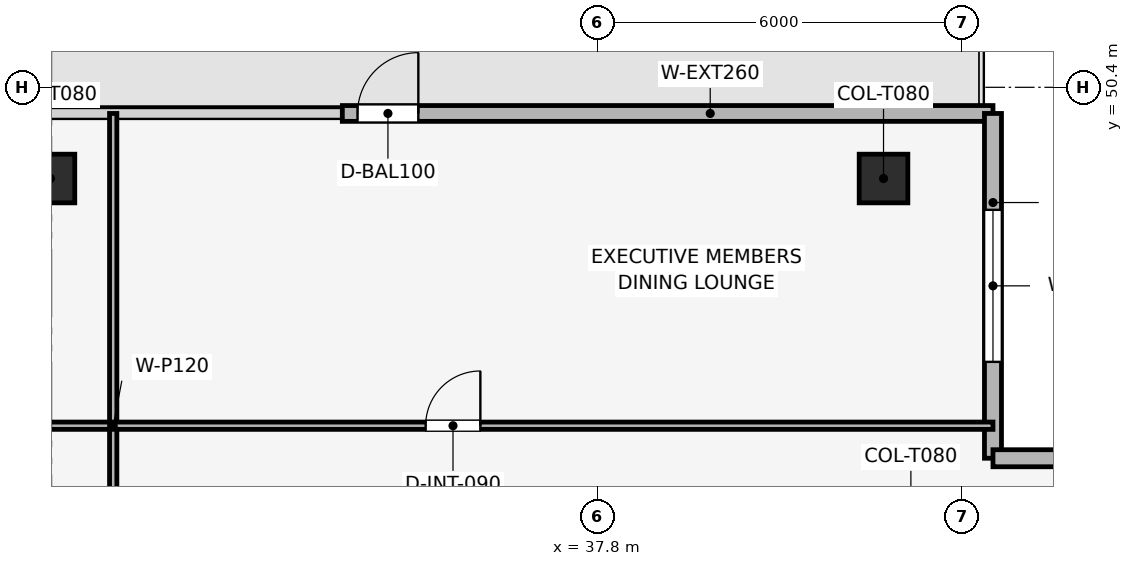
"""IFC4 building model, lengths in metres.
Left out: names, types, materials, properties, quantities, classifications, styles, units other than length and angle.
Written with IfcOpenShell. Run it as: python <this file> out.ifc"""

import sys

from ifc_helpers import new_model, si_unit, direction, frame, frame_2d, origin, origin_2d, place, context, subcontext, project, spatial, rectangle, extrude, element, fill, save


model = new_model("IFC4")
c1 = context("Model", 3, precision=1e-05, world=origin(), true_north=direction((0.0, 1.0)))
c2 = subcontext(c1, "Body", "Model", "MODEL_VIEW")
j1 = project(units=[si_unit("LENGTHUNIT", "METRE"), si_unit("PLANEANGLEUNIT", "RADIAN")], contexts=[c1])
p1 = place(None, origin())
s1 = spatial("IfcSite", under=j1, at=p1, CompositionType="ELEMENT")
p2 = place(p1, origin())
s2 = spatial("IfcBuilding", under=s1, at=p2, CompositionType="ELEMENT")
p3 = place(p2, frame((0.0, 0.0, 348.0)))
s3 = spatial("IfcBuildingStorey", under=s2, at=p3, CompositionType="ELEMENT", Elevation=348.0)
for number, where, z_axis, x_axis in (
    (1, (42.5, 48.9, 0.003), (0.0, 0.0, 1.0), (1.0, 0.0, 0.0)),
    (2, (28.8, 48.9, 0.003), (0.0, 0.0, 1.0), (1.0, 0.0, 0.0)),
):
    element("IfcColumn", number, at=place(p3, frame(where, z_axis=z_axis, x_axis=x_axis)), inside=s3, PredefinedType="COLUMN", context=c2, shape_type="SweptSolid", body=[
        extrude(rectangle(XDim=0.8, YDim=0.8, at=origin_2d()), origin(), (0.0, 0.0, 1.0), 3.504),
    ])
p4 = place(p3, frame((33.6, 49.97, 0.0), z_axis=(0.0, 0.0, 1.0), x_axis=(1.0, 0.0, 0.0)))
e3 = element("IfcWall", 3, at=p4, inside=s3, PredefinedType="SOLIDWALL", context=c2, shape_type="SweptSolid", body=[
    extrude(rectangle(XDim=10.7, YDim=0.26, at=frame_2d((5.35, 0.0))), origin(), (0.0, 0.0, 1.0), 3.51),
])
p5 = place(p4, frame((0.25, 0.0, 0.0)))
e4 = element("IfcOpeningElement", 4, at=p5, cuts=e3, PredefinedType="OPENING", context=c2, shape_type="SweptSolid", body=[
    extrude(rectangle(XDim=1.0, YDim=2.2, at=frame_2d((0.5, 1.1))), frame((0.0, 0.14, 0.0), z_axis=(0.0, -1.0, 0.0), x_axis=(1.0, 0.0, 0.0)), (0.0, 0.0, 1.0), 0.28),
])
p6 = place(p3, frame((44.3, 49.97, 0.0), z_axis=(0.0, 0.0, 1.0), x_axis=(0.0, -1.0, 0.0)))
e5 = element("IfcWall", 5, at=p6, inside=s3, PredefinedType="SOLIDWALL", context=c2, shape_type="SweptSolid", body=[
    extrude(rectangle(XDim=5.67, YDim=0.28, at=frame_2d((2.835, 0.0))), origin(), (0.0, 0.0, 1.0), 3.51),
])
p7 = place(p6, frame((1.585, 0.0, 0.9)))
e6 = element("IfcOpeningElement", 6, at=p7, cuts=e5, PredefinedType="OPENING", context=c2, shape_type="SweptSolid", body=[
    extrude(rectangle(XDim=2.5, YDim=1.9, at=frame_2d((1.25, 0.95))), frame((0.0, 0.15, 0.0), z_axis=(0.0, -1.0, 0.0), x_axis=(1.0, 0.0, 0.0)), (0.0, 0.0, 1.0), 0.3),
])
p8 = place(p3, frame((44.3, 44.3, 0.0), z_axis=(0.0, 0.0, 1.0), x_axis=(1.0, 0.0, 0.0)))
e7 = element("IfcWall", 7, at=p8, inside=s3, PredefinedType="SOLIDWALL", context=c2, shape_type="SweptSolid", body=[
    extrude(rectangle(XDim=5.67, YDim=0.28, at=frame_2d((2.835, 0.0))), origin(), (0.0, 0.0, 1.0), 3.51),
])
p9 = place(p8, frame((1.585, 0.0, 0.9)))
e8 = element("IfcOpeningElement", 8, at=p9, cuts=e7, PredefinedType="OPENING", context=c2, shape_type="SweptSolid", body=[
    extrude(rectangle(XDim=2.5, YDim=1.9, at=frame_2d((1.25, 0.95))), frame((0.0, 0.15, 0.0), z_axis=(0.0, -1.0, 0.0), x_axis=(1.0, 0.0, 0.0)), (0.0, 0.0, 1.0), 0.3),
])
p10 = place(p3, frame((13.3, 44.835, 0.0), z_axis=(0.0, 0.0, 1.0), x_axis=(1.0, 0.0, 0.0)))
e9 = element("IfcWall", 9, at=p10, inside=s3, PredefinedType="PARTITIONING", context=c2, shape_type="SweptSolid", body=[
    extrude(rectangle(XDim=16.532, YDim=0.12, at=frame_2d((8.266, 0.0))), origin(), (0.0, 0.0, 1.0), 3.095),
])
p11 = place(p10, frame((8.451, 0.0, 0.0)))
e10 = element("IfcOpeningElement", 10, at=p11, cuts=e9, PredefinedType="OPENING", context=c2, shape_type="SweptSolid", body=[
    extrude(rectangle(XDim=0.9, YDim=2.1, at=frame_2d((0.45, 1.05))), frame((0.0, 0.07, 0.0), z_axis=(0.0, -1.0, 0.0), x_axis=(1.0, 0.0, 0.0)), (0.0, 0.0, 1.0), 0.14),
])
p12 = place(p3, frame((29.832, 39.7, 0.0), z_axis=(0.0, 0.0, 1.0), x_axis=(0.0, 1.0, 0.0)))
e11 = element("IfcWall", 11, at=p12, inside=s3, PredefinedType="PARTITIONING", context=c2, shape_type="SweptSolid", body=[
    extrude(rectangle(XDim=10.27, YDim=0.12, at=frame_2d((5.135, 0.0))), origin(), (0.0, 0.0, 1.0), 3.135),
])
p13 = place(p3, frame((29.832, 44.835, 0.0), z_axis=(0.0, 0.0, 1.0), x_axis=(1.0, 0.0, 0.0)))
e12 = element("IfcWall", 12, at=p13, inside=s3, PredefinedType="PARTITIONING", context=c2, shape_type="SweptSolid", body=[
    extrude(rectangle(XDim=14.468, YDim=0.12, at=frame_2d((7.234, 0.0))), origin(), (0.0, 0.0, 1.0), 3.095),
])
p14 = place(p13, frame((5.138, 0.0, 0.0)))
e13 = element("IfcOpeningElement", 13, at=p14, cuts=e12, PredefinedType="OPENING", context=c2, shape_type="SweptSolid", body=[
    extrude(rectangle(XDim=0.9, YDim=2.1, at=frame_2d((0.45, 1.05))), frame((0.0, 0.07, 0.0), z_axis=(0.0, -1.0, 0.0), x_axis=(1.0, 0.0, 0.0)), (0.0, 0.0, 1.0), 0.14),
])
p15 = place(p5, origin())
e14 = element("IfcDoor", 14, at=p15, inside=s3, OperationType="SINGLE_SWING_RIGHT", PredefinedType="DOOR", context=c2, shape_type="SweptSolid", body=[
    extrude(rectangle(XDim=1.0, YDim=2.2, at=frame_2d((0.5, 1.1))), frame((0.0, 0.025, 0.0), z_axis=(0.0, -1.0, 0.0), x_axis=(1.0, 0.0, 0.0)), (0.0, 0.0, 1.0), 0.05),
])
fill(e4, e14)
p16 = place(p7, origin())
e15 = element("IfcWindow", 15, at=p16, inside=s3, PartitioningType="SINGLE_PANEL", PredefinedType="WINDOW", context=c2, shape_type="SweptSolid", body=[
    extrude(rectangle(XDim=2.5, YDim=1.9, at=frame_2d((1.25, 0.95))), frame((0.0, 0.03, 0.0), z_axis=(0.0, -1.0, 0.0), x_axis=(1.0, 0.0, 0.0)), (0.0, 0.0, 1.0), 0.06),
])
fill(e6, e15)
p17 = place(p14, origin())
e16 = element("IfcDoor", 16, at=p17, inside=s3, OperationType="SINGLE_SWING_RIGHT", PredefinedType="DOOR", context=c2, shape_type="SweptSolid", body=[
    extrude(rectangle(XDim=0.9, YDim=2.1, at=frame_2d((0.45, 1.05))), frame((0.0, 0.025, 0.0), z_axis=(0.0, -1.0, 0.0), x_axis=(1.0, 0.0, 0.0)), (0.0, 0.0, 1.0), 0.05),
])
fill(e13, e16)
save(model, sys.argv[1])
